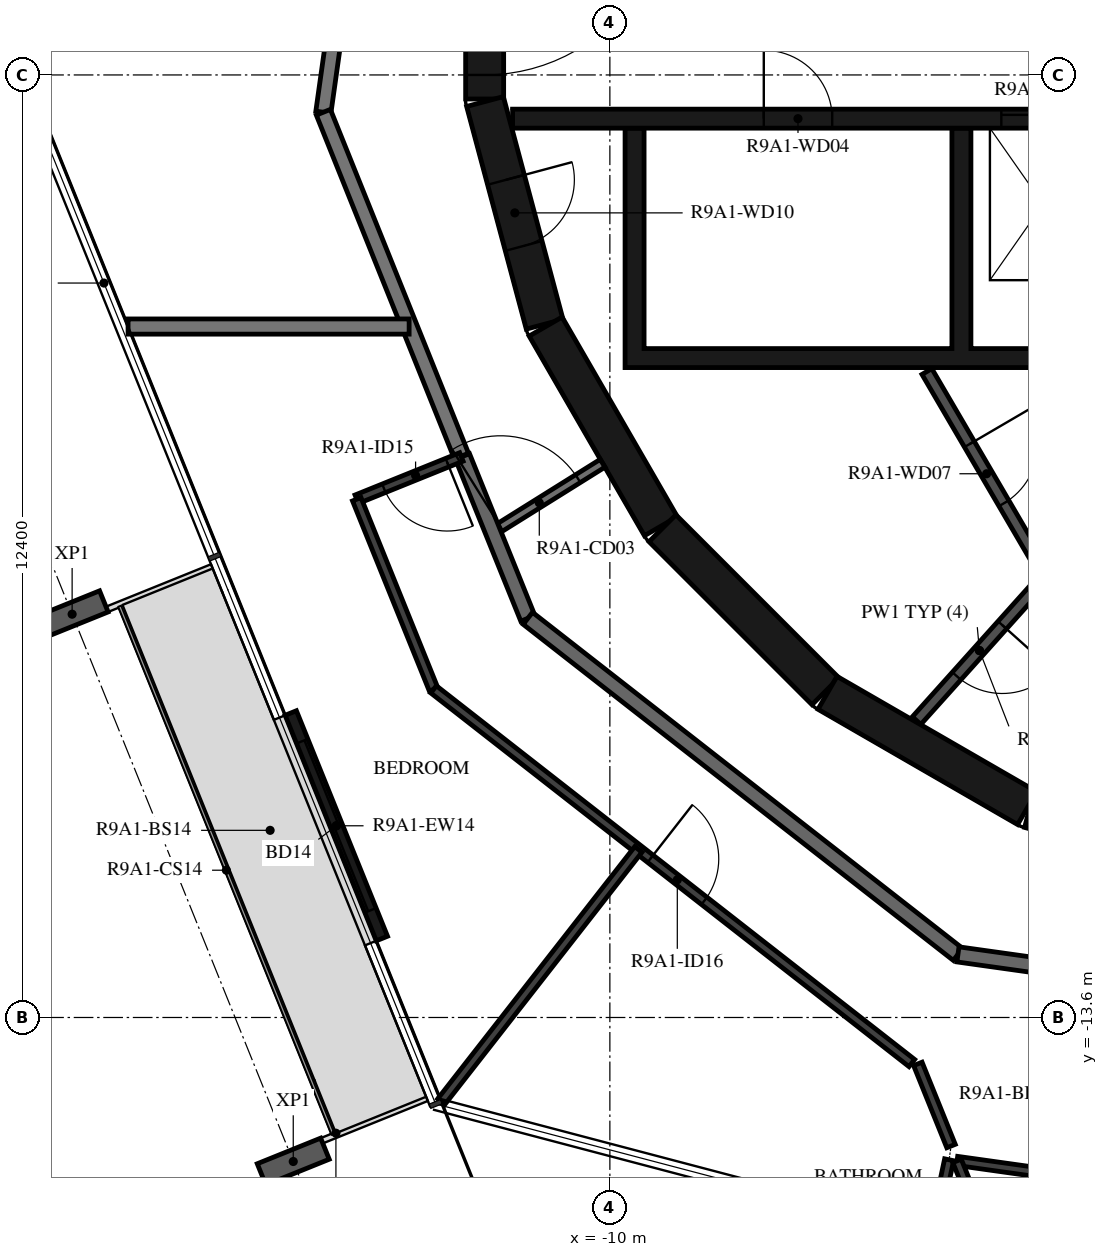
"""IFC4 building model, lengths in metres.
Left out: names, types, materials, properties, quantities, classifications, styles, units other than length and angle.
Written with IfcOpenShell. Run it as: python <this file> out.ifc"""

import sys

from ifc_helpers import new_model, si_unit, direction, frame, frame_2d, origin, origin_2d, place, context, subcontext, project, spatial, polyline, rectangle, i_section, outline, extrude, element, fill, save


model = new_model("IFC4")
c1 = context("Model", 3, precision=1e-05, world=origin(), true_north=direction((0.0, 1.0)))
c2 = subcontext(c1, "Body", "Model", "MODEL_VIEW")
j1 = project(units=[si_unit("LENGTHUNIT", "METRE"), si_unit("PLANEANGLEUNIT", "RADIAN")], contexts=[c1])
p1 = place(None, origin())
s1 = spatial("IfcSite", under=j1, at=p1, CompositionType="ELEMENT")
p2 = place(p1, origin())
s2 = spatial("IfcBuilding", under=s1, at=p2, CompositionType="ELEMENT")
p3 = place(p2, frame((0.0, 0.0, 336.5)))
s3 = spatial("IfcBuildingStorey", under=s2, at=p3, CompositionType="ELEMENT", Elevation=336.5)
for number, where, z_axis, x_axis in (
    (1, (-17.075, -8.294, -0.38), (0.0, 0.0, 1.0), (-0.375, 0.927, 0.0)),
    (2, (-14.166, -15.495, -0.38), (0.0, 0.0, 1.0), (-0.375, 0.927, 0.0)),
):
    element("IfcColumn", number, at=place(p3, frame(where, z_axis=z_axis, x_axis=x_axis)), inside=s3, PredefinedType="COLUMN", context=c2, shape_type="SweptSolid", body=[
        extrude(i_section(OverallWidth=0.3, OverallDepth=0.9, WebThickness=0.019, FlangeThickness=0.035, FilletRadius=0.03, at=origin_2d()), origin(), (0.0, 0.0, 1.0), 3.5),
    ])
p4 = place(p3, frame((-14.198, -9.594, 0.0), z_axis=(0.0, 0.0, 1.0), x_axis=(0.374624519695, -0.927176611678, 0.0)))
e3 = element("IfcWall", 3, at=p4, inside=s3, PredefinedType="STANDARD", context=c2, shape_type="SweptSolid", body=[
    extrude(rectangle(XDim=3.2, YDim=0.16, at=frame_2d((1.6, 0.0))), origin(), (0.0, 0.0, 1.0), 3.12),
])
p5 = place(p4, frame((0.4, 0.0, 0.0)))
e4 = element("IfcOpeningElement", 4, at=p5, cuts=e3, PredefinedType="OPENING", context=c2, shape_type="SweptSolid", body=[
    extrude(rectangle(XDim=2.4, YDim=2.4, at=frame_2d((1.2, 1.2))), frame((0.0, 0.09, 0.0), z_axis=(0.0, -1.0, 0.0), x_axis=(1.0, 0.0, 0.0)), (0.0, 0.0, 1.0), 0.18),
])
p6 = place(p3, frame((-11.647, 1.516, 0.0), z_axis=(0.0, 0.0, 1.0), x_axis=(0.0, -1.0, 0.0)))
e5 = element("IfcWall", 5, at=p6, inside=s3, PredefinedType="SHEAR", context=c2, shape_type="SweptSolid", body=[
    extrude(rectangle(XDim=3.033, YDim=0.5, at=frame_2d((1.516, 0.0))), origin(), (0.0, 0.0, 1.0), 3.12),
])
p7 = place(p6, frame((0.316, 0.0, 0.0)))
e6 = element("IfcOpeningElement", 6, at=p7, cuts=e5, PredefinedType="OPENING", context=c2, shape_type="SweptSolid", body=[
    extrude(rectangle(XDim=2.4, YDim=2.1, at=frame_2d((1.2, 1.05))), frame((0.0, 0.26, 0.0), z_axis=(0.0, -1.0, 0.0), x_axis=(1.0, 0.0, 0.0)), (0.0, 0.0, 1.0), 0.52),
])
p8 = place(p3, frame((-11.643, -1.55, 0.0), z_axis=(0.0, 0.0, 1.0), x_axis=(0.258734743916, -0.965948410781, 0.0)))
e7 = element("IfcWall", 7, at=p8, inside=s3, PredefinedType="SHEAR", context=c2, shape_type="SweptSolid", body=[
    extrude(rectangle(XDim=3.033, YDim=0.5, at=frame_2d((1.516, 0.0))), origin(), (0.0, 0.0, 1.0), 3.12),
])
p9 = place(p8, frame((1.066, 0.0, 0.0)))
e8 = element("IfcOpeningElement", 8, at=p9, cuts=e7, PredefinedType="OPENING", context=c2, shape_type="SweptSolid", body=[
    extrude(rectangle(XDim=0.9, YDim=2.1, at=frame_2d((0.45, 1.05))), frame((0.0, 0.26, 0.0), z_axis=(0.0, -1.0, 0.0), x_axis=(1.0, 0.0, 0.0)), (0.0, 0.0, 1.0), 0.52),
])
p10 = place(p3, frame((-10.845, -4.51, 0.0), z_axis=(0.0, 0.0, 1.0), x_axis=(0.500087131594, -0.865975092491, 0.0)))
e9 = element("IfcWall", 9, at=p10, inside=s3, PredefinedType="SHEAR", context=c2, shape_type="SweptSolid", body=[
    extrude(rectangle(XDim=3.033, YDim=0.5, at=frame_2d((1.516, 0.0))), origin(), (0.0, 0.0, 1.0), 3.12),
])
p11 = place(p3, frame((-9.308, -7.164, 0.0), z_axis=(0.0, 0.0, 1.0), x_axis=(0.707106781187, -0.707106781187, 0.0)))
e10 = element("IfcWall", 10, at=p11, inside=s3, PredefinedType="SHEAR", context=c2, shape_type="SweptSolid", body=[
    extrude(rectangle(XDim=3.032, YDim=0.5, at=frame_2d((1.516, 0.0))), origin(), (0.0, 0.0, 1.0), 3.12),
])
for number, where, z_axis, x_axis in (
    (11, (-7.137, -9.329, 0.0), (0.0, 0.0, 1.0), (0.866, -0.5, 0.0)),
    (12, (-4.479, -10.858, 0.0), (0.0, 0.0, 1.0), (0.966, -0.259, 0.0)),
):
    element("IfcWall", number, at=place(p3, frame(where, z_axis=z_axis, x_axis=x_axis)), inside=s3, PredefinedType="SHEAR", context=c2, shape_type="SweptSolid", body=[
        extrude(rectangle(XDim=3.033, YDim=0.5, at=frame_2d((1.516, 0.0))), origin(), (0.0, 0.0, 1.0), 3.12),
    ])
p12 = place(p3, origin())
e13 = element("IfcWall", 13, at=p12, inside=s3, PredefinedType="SHEAR", context=c2, shape_type="SweptSolid", body=[
    extrude(outline(polyline([(9.8, -5.05), (9.8, -4.8), (9.8, -1.9), (9.55, -1.9), (9.55, -4.8), (7.65, -4.8), (7.65, -1.9), (7.4, -1.9), (7.4, -4.8), (5.5, -4.8), (5.5, -1.9), (5.25, -1.9), (5.25, -4.8), (3.35, -4.8), (3.35, -1.9), (3.1, -1.9), (3.1, -4.8), (1.2, -4.8), (1.2, -1.9), (0.95, -1.9), (0.95, -4.8), (-0.95, -4.8), (-0.95, -1.9), (-1.2, -1.9), (-1.2, -4.8), (-3.1, -4.8), (-3.1, -1.9), (-3.35, -1.9), (-3.35, -4.8), (-5.25, -4.8), (-5.25, -1.9), (-5.5, -1.9), (-5.5, -4.8), (-9.55, -4.8), (-9.55, -1.9), (-9.8, -1.9), (-9.8, -4.8), (-9.8, -5.05), (9.8, -5.05)])), origin(), (0.0, 0.0, 1.0), 3.12),
])
p13 = place(p3, frame((-11.28, -1.775, 0.0), z_axis=(0.0, 0.0, 1.0), x_axis=(1.0, 0.0, 0.0)))
e14 = element("IfcWall", 14, at=p13, inside=s3, PredefinedType="SHEAR", context=c2, shape_type="SweptSolid", body=[
    extrude(rectangle(XDim=14.38, YDim=0.25, at=frame_2d((7.19, 0.0))), origin(), (0.0, 0.0, 1.0), 3.12),
])
p14 = place(p13, frame((6.43, 0.0, 0.0)))
e15 = element("IfcOpeningElement", 15, at=p14, cuts=e14, PredefinedType="OPENING", context=c2, shape_type="SweptSolid", body=[
    extrude(rectangle(XDim=1.1, YDim=2.1, at=frame_2d((0.55, 1.05))), frame((0.0, 0.135, 0.0), z_axis=(0.0, -1.0, 0.0), x_axis=(1.0, 0.0, 0.0)), (0.0, 0.0, 1.0), 0.27),
])
p15 = place(p13, frame((8.58, 0.0, 0.0)))
e16 = element("IfcOpeningElement", 16, at=p15, cuts=e14, PredefinedType="OPENING", context=c2, shape_type="SweptSolid", body=[
    extrude(rectangle(XDim=1.1, YDim=2.1, at=frame_2d((0.55, 1.05))), frame((0.0, 0.135, 0.0), z_axis=(0.0, -1.0, 0.0), x_axis=(1.0, 0.0, 0.0)), (0.0, 0.0, 1.0), 0.27),
])
p16 = place(p13, frame((10.73, 0.0, 0.0)))
e17 = element("IfcOpeningElement", 17, at=p16, cuts=e14, PredefinedType="OPENING", context=c2, shape_type="SweptSolid", body=[
    extrude(rectangle(XDim=1.1, YDim=2.1, at=frame_2d((0.55, 1.05))), frame((0.0, 0.135, 0.0), z_axis=(0.0, -1.0, 0.0), x_axis=(1.0, 0.0, 0.0)), (0.0, 0.0, 1.0), 0.27),
])
p17 = place(p13, frame((3.305, 0.0, 0.0)))
e18 = element("IfcOpeningElement", 18, at=p17, cuts=e14, PredefinedType="OPENING", context=c2, shape_type="SweptSolid", body=[
    extrude(rectangle(XDim=0.9, YDim=2.1, at=frame_2d((0.45, 1.05))), frame((0.0, 0.135, 0.0), z_axis=(0.0, -1.0, 0.0), x_axis=(1.0, 0.0, 0.0)), (0.0, 0.0, 1.0), 0.27),
])
p18 = place(p13, frame((12.98, 0.0, 0.0)))
e19 = element("IfcOpeningElement", 19, at=p18, cuts=e14, PredefinedType="OPENING", context=c2, shape_type="SweptSolid", body=[
    extrude(rectangle(XDim=0.9, YDim=2.1, at=frame_2d((0.45, 1.05))), frame((0.0, 0.135, 0.0), z_axis=(0.0, -1.0, 0.0), x_axis=(1.0, 0.0, 0.0)), (0.0, 0.0, 1.0), 0.27),
])
p19 = place(p3, frame((-5.829, -5.102, 0.0), z_axis=(0.0, 0.0, 1.0), x_axis=(0.504480008384, -0.863423373057, 0.0)))
e20 = element("IfcWall", 20, at=p19, inside=s3, PredefinedType="PARTITIONING", context=c2, shape_type="SweptSolid", body=[
    extrude(rectangle(XDim=3.115, YDim=0.15, at=frame_2d((1.558, 0.0))), origin(), (0.0, 0.0, 1.0), 3.12),
])
p20 = place(p19, frame((1.107, 0.0, 0.0)))
e21 = element("IfcOpeningElement", 21, at=p20, cuts=e20, PredefinedType="OPENING", context=c2, shape_type="SweptSolid", body=[
    extrude(rectangle(XDim=0.9, YDim=2.1, at=frame_2d((0.45, 1.05))), frame((0.0, 0.085, 0.0), z_axis=(0.0, -1.0, 0.0), x_axis=(1.0, 0.0, 0.0)), (0.0, 0.0, 1.0), 0.17),
])
p21 = place(p3, frame((-4.311, -7.851, 0.0), z_axis=(0.0, 0.0, 1.0), x_axis=(-0.667869133096, -0.744278725383, 0.0)))
e22 = element("IfcWall", 22, at=p21, inside=s3, PredefinedType="PARTITIONING", context=c2, shape_type="SweptSolid", body=[
    extrude(rectangle(XDim=2.476, YDim=0.15, at=frame_2d((1.238, 0.0))), origin(), (0.0, 0.0, 1.0), 3.12),
])
p22 = place(p21, frame((0.788, 0.0, 0.0)))
e23 = element("IfcOpeningElement", 23, at=p22, cuts=e22, PredefinedType="OPENING", context=c2, shape_type="SweptSolid", body=[
    extrude(rectangle(XDim=0.9, YDim=2.1, at=frame_2d((0.45, 1.05))), frame((0.0, 0.085, 0.0), z_axis=(0.0, -1.0, 0.0), x_axis=(1.0, 0.0, 0.0)), (0.0, 0.0, 1.0), 0.17),
])
p23 = place(p3, frame((-11.539, -7.21, 0.0), z_axis=(0.0, 0.0, 1.0), x_axis=(0.848103039868, 0.529831325769, 0.0)))
e24 = element("IfcWall", 24, at=p23, inside=s3, PredefinedType="PARTITIONING", context=c2, shape_type="SweptSolid", body=[
    extrude(rectangle(XDim=1.702, YDim=0.12, at=frame_2d((0.851, 0.0))), origin(), (0.0, 0.0, 1.0), 3.12),
])
p24 = place(p23, frame((0.12, 0.0, 0.0)))
e25 = element("IfcOpeningElement", 25, at=p24, cuts=e24, PredefinedType="OPENING", context=c2, shape_type="SweptSolid", body=[
    extrude(rectangle(XDim=1.2, YDim=2.1, at=frame_2d((0.6, 1.05))), frame((0.0, 0.07, 0.0), z_axis=(0.0, -1.0, 0.0), x_axis=(1.0, 0.0, 0.0)), (0.0, 0.0, 1.0), 0.14),
])
p25 = place(p3, frame((-12.77, 5.42, 0.0), z_axis=(0.0, 0.0, 1.0), x_axis=(-0.139155334385, -0.990270565508, 0.0)))
e26 = element("IfcWall", 26, at=p25, inside=s3, PredefinedType="STANDARD", context=c2, shape_type="SweptSolid", body=[
    extrude(rectangle(XDim=7.181, YDim=0.2, at=frame_2d((3.59, 0.0))), origin(), (0.0, 0.0, 1.0), 3.12),
])
p26 = place(p25, frame((1.055, 0.0, 0.0)))
e27 = element("IfcOpeningElement", 27, at=p26, cuts=e26, PredefinedType="OPENING", context=c2, shape_type="SweptSolid", body=[
    extrude(rectangle(XDim=1.8, YDim=2.1, at=frame_2d((0.9, 1.05))), frame((0.0, 0.11, 0.0), z_axis=(0.0, -1.0, 0.0), x_axis=(1.0, 0.0, 0.0)), (0.0, 0.0, 1.0), 0.22),
])
p27 = place(p3, frame((-13.769, -1.691, 0.0), z_axis=(0.0, 0.0, 1.0), x_axis=(0.372720094028, -0.927943819155, 0.0)))
e28 = element("IfcWall", 28, at=p27, inside=s3, PredefinedType="STANDARD", context=c2, shape_type="SweptSolid", body=[
    extrude(rectangle(XDim=4.875, YDim=0.2, at=frame_2d((2.438, 0.0))), origin(), (0.0, 0.0, 1.0), 3.12),
])
p28 = place(p3, frame((-11.939, -6.22, 0.0), z_axis=(0.0, 0.0, 1.0), x_axis=(0.374651128394, -0.927165860024, 0.0)))
e29 = element("IfcWall", 29, at=p28, inside=s3, PredefinedType="STANDARD", context=c2, shape_type="SweptSolid", body=[
    extrude(rectangle(XDim=2.296, YDim=0.2, at=frame_2d((1.148, 0.0))), origin(), (0.0, 0.0, 1.0), 3.12),
])
p29 = place(p3, frame((-11.079, -8.349, 0.0), z_axis=(0.0, 0.0, 1.0), x_axis=(0.78800478687, -0.615669112324, 0.0)))
e30 = element("IfcWall", 30, at=p29, inside=s3, PredefinedType="STANDARD", context=c2, shape_type="SweptSolid", body=[
    extrude(rectangle(XDim=7.181, YDim=0.2, at=frame_2d((3.591, 0.0))), origin(), (0.0, 0.0, 1.0), 3.12),
])
p30 = place(p3, frame((-5.42, -12.77, 0.0), z_axis=(0.0, 0.0, 1.0), x_axis=(0.990270565508, -0.139155334385, 0.0)))
e31 = element("IfcWall", 31, at=p30, inside=s3, PredefinedType="STANDARD", context=c2, shape_type="SweptSolid", body=[
    extrude(rectangle(XDim=7.181, YDim=0.2, at=frame_2d((3.59, 0.0))), origin(), (0.0, 0.0, 1.0), 3.12),
])
p31 = place(p30, frame((2.39, 0.0, 0.0)))
e32 = element("IfcOpeningElement", 32, at=p31, cuts=e31, PredefinedType="OPENING", context=c2, shape_type="SweptSolid", body=[
    extrude(rectangle(XDim=1.0, YDim=2.1, at=frame_2d((0.5, 1.05))), frame((0.0, 0.11, 0.0), z_axis=(0.0, -1.0, 0.0), x_axis=(1.0, 0.0, 0.0)), (0.0, 0.0, 1.0), 0.22),
])
p32 = place(p30, frame((4.091, 0.0, 0.0)))
e33 = element("IfcOpeningElement", 33, at=p32, cuts=e31, PredefinedType="OPENING", context=c2, shape_type="SweptSolid", body=[
    extrude(rectangle(XDim=1.0, YDim=2.1, at=frame_2d((0.5, 1.05))), frame((0.0, 0.11, 0.0), z_axis=(0.0, -1.0, 0.0), x_axis=(1.0, 0.0, 0.0)), (0.0, 0.0, 1.0), 0.22),
])
p33 = place(p3, frame((-16.339, -4.51, 0.0), z_axis=(0.0, 0.0, 1.0), x_axis=(1.0, 0.0, 0.0)))
e34 = element("IfcWall", 34, at=p33, inside=s3, PredefinedType="STANDARD", context=c2, shape_type="SweptSolid", body=[
    extrude(rectangle(XDim=3.698, YDim=0.2, at=frame_2d((1.849, 0.0))), origin(), (0.0, 0.0, 1.0), 3.12),
])
p34 = place(p3, frame((-11.953, -6.225, 0.0), z_axis=(0.0, 0.0, 1.0), x_axis=(-0.927144096717, -0.374704982518, 0.0)))
e35 = element("IfcWall", 35, at=p34, inside=s3, PredefinedType="PARTITIONING", context=c2, shape_type="SweptSolid", body=[
    extrude(rectangle(XDim=1.485, YDim=0.12, at=frame_2d((0.742, 0.0))), origin(), (0.0, 0.0, 1.0), 3.12),
])
p35 = place(p34, frame((0.2, 0.0, 0.0)))
e36 = element("IfcOpeningElement", 36, at=p35, cuts=e35, PredefinedType="OPENING", context=c2, shape_type="SweptSolid", body=[
    extrude(rectangle(XDim=0.9, YDim=2.1, at=frame_2d((0.45, 1.05))), frame((0.0, 0.07, 0.0), z_axis=(0.0, -1.0, 0.0), x_axis=(1.0, 0.0, 0.0)), (0.0, 0.0, 1.0), 0.14),
])
p36 = place(p3, frame((-13.33, -6.782, 0.0), z_axis=(0.0, 0.0, 1.0), x_axis=(0.374602180132, -0.927185637637, 0.0)))
e37 = element("IfcWall", 37, at=p36, inside=s3, PredefinedType="PARTITIONING", context=c2, shape_type="SweptSolid", body=[
    extrude(rectangle(XDim=2.698, YDim=0.12, at=frame_2d((1.349, 0.0))), origin(), (0.0, 0.0, 1.0), 3.12),
])
p37 = place(p3, frame((-12.319, -9.283, 0.0), z_axis=(0.0, 0.0, 1.0), x_axis=(0.788000268464, -0.61567489546, 0.0)))
e38 = element("IfcWall", 38, at=p37, inside=s3, PredefinedType="PARTITIONING", context=c2, shape_type="SweptSolid", body=[
    extrude(rectangle(XDim=7.985, YDim=0.12, at=frame_2d((3.992, 0.0))), origin(), (0.0, 0.0, 1.0), 3.12),
])
p38 = place(p37, frame((3.619, 0.0, 0.0)))
e39 = element("IfcOpeningElement", 39, at=p38, cuts=e38, PredefinedType="OPENING", context=c2, shape_type="SweptSolid", body=[
    extrude(rectangle(XDim=0.9, YDim=2.1, at=frame_2d((0.45, 1.05))), frame((0.0, 0.07, 0.0), z_axis=(0.0, -1.0, 0.0), x_axis=(1.0, 0.0, 0.0)), (0.0, 0.0, 1.0), 0.14),
])
p39 = place(p3, frame((-5.948, -14.21, 0.0), z_axis=(0.0, 0.0, 1.0), x_axis=(0.374601530156, -0.927185900241, 0.0)))
e40 = element("IfcWall", 40, at=p39, inside=s3, PredefinedType="PARTITIONING", context=c2, shape_type="SweptSolid", body=[
    extrude(rectangle(XDim=1.166, YDim=0.12, at=frame_2d((0.583, 0.0))), origin(), (0.0, 0.0, 1.0), 3.12),
])
p40 = place(p3, frame((-5.433, -15.487, 0.0), z_axis=(0.0, 0.0, 1.0), x_axis=(0.990268451053, -0.139170380644, 0.0)))
e41 = element("IfcWall", 41, at=p40, inside=s3, PredefinedType="PARTITIONING", context=c2, shape_type="SweptSolid", body=[
    extrude(rectangle(XDim=1.595, YDim=0.12, at=frame_2d((0.797, 0.0))), origin(), (0.0, 0.0, 1.0), 3.12),
])
p41 = place(p3, frame((-12.219, -14.708, 0.0), z_axis=(0.0, 0.0, 1.0), x_axis=(0.615656413137, 0.788014708596, 0.0)))
e42 = element("IfcWall", 42, at=p41, inside=s3, PredefinedType="PARTITIONING", context=c2, shape_type="SweptSolid", body=[
    extrude(rectangle(XDim=4.213, YDim=0.12, at=frame_2d((2.106, 0.0))), origin(), (0.0, 0.0, 1.0), 3.12),
])
p42 = place(p3, frame((-7.305, -23.815, 0.0), z_axis=(0.0, 0.0, 1.0), x_axis=(0.207366409306, 0.978263345062, 0.0)))
e43 = element("IfcWall", 43, at=p42, inside=s3, PredefinedType="PARTITIONING", context=c2, shape_type="SweptSolid", body=[
    extrude(rectangle(XDim=8.529, YDim=0.12, at=frame_2d((4.264, 0.0))), origin(), (0.0, 0.0, 1.0), 3.12),
])
p43 = place(p42, frame((0.4, 0.0, 0.0)))
e44 = element("IfcOpeningElement", 44, at=p43, cuts=e43, PredefinedType="OPENING", context=c2, shape_type="SweptSolid", body=[
    extrude(rectangle(XDim=0.9, YDim=2.1, at=frame_2d((0.45, 1.05))), frame((0.0, 0.07, 0.0), z_axis=(0.0, -1.0, 0.0), x_axis=(1.0, 0.0, 0.0)), (0.0, 0.0, 1.0), 0.14),
])
p44 = place(p3, frame((-4.445, -17.93, 0.0), z_axis=(0.0, 0.0, 1.0), x_axis=(-0.374614676827, 0.927180588616, 0.0)))
e45 = element("IfcWall", 45, at=p44, inside=s3, PredefinedType="PARTITIONING", context=c2, shape_type="SweptSolid", body=[
    extrude(rectangle(XDim=2.635, YDim=0.12, at=frame_2d((1.318, 0.0))), origin(), (0.0, 0.0, 1.0), 3.12),
])
p45 = place(p5, origin())
e46 = element("IfcDoor", 46, at=p45, inside=s3, OperationType="DOUBLE_DOOR_SLIDING", PredefinedType="DOOR", context=c2, shape_type="SweptSolid", body=[
    extrude(rectangle(XDim=2.4, YDim=2.4, at=frame_2d((1.2, 1.2))), frame((0.0, 0.025, 0.0), z_axis=(0.0, -1.0, 0.0), x_axis=(1.0, 0.0, 0.0)), (0.0, 0.0, 1.0), 0.05),
])
fill(e4, e46)
p46 = place(p7, origin())
e47 = element("IfcDoor", 47, at=p46, inside=s3, OperationType="DOUBLE_DOOR_SINGLE_SWING", PredefinedType="DOOR", context=c2, shape_type="SweptSolid", body=[
    extrude(rectangle(XDim=2.4, YDim=2.1, at=frame_2d((1.2, 1.05))), frame((0.0, 0.025, 0.0), z_axis=(0.0, -1.0, 0.0), x_axis=(1.0, 0.0, 0.0)), (0.0, 0.0, 1.0), 0.05),
])
fill(e6, e47)
p47 = place(p14, origin())
e48 = element("IfcDoor", 48, at=p47, inside=s3, OperationType="DOUBLE_DOOR_SLIDING", PredefinedType="DOOR", context=c2, shape_type="SweptSolid", body=[
    extrude(rectangle(XDim=1.1, YDim=2.1, at=frame_2d((0.55, 1.05))), frame((0.0, 0.025, 0.0), z_axis=(0.0, -1.0, 0.0), x_axis=(1.0, 0.0, 0.0)), (0.0, 0.0, 1.0), 0.05),
])
fill(e15, e48)
p48 = place(p17, origin())
e49 = element("IfcDoor", 49, at=p48, inside=s3, OperationType="SINGLE_SWING_RIGHT", PredefinedType="DOOR", context=c2, shape_type="SweptSolid", body=[
    extrude(rectangle(XDim=0.9, YDim=2.1, at=frame_2d((0.45, 1.05))), frame((0.0, 0.025, 0.0), z_axis=(0.0, -1.0, 0.0), x_axis=(1.0, 0.0, 0.0)), (0.0, 0.0, 1.0), 0.05),
])
fill(e18, e49)
p49 = place(p22, origin())
e50 = element("IfcDoor", 50, at=p49, inside=s3, OperationType="SINGLE_SWING_RIGHT", PredefinedType="DOOR", context=c2, shape_type="SweptSolid", body=[
    extrude(rectangle(XDim=0.9, YDim=2.1, at=frame_2d((0.45, 1.05))), frame((0.0, 0.025, 0.0), z_axis=(0.0, -1.0, 0.0), x_axis=(1.0, 0.0, 0.0)), (0.0, 0.0, 1.0), 0.05),
])
fill(e23, e50)
p50 = place(p20, origin())
e51 = element("IfcDoor", 51, at=p50, inside=s3, OperationType="SINGLE_SWING_LEFT", PredefinedType="DOOR", context=c2, shape_type="SweptSolid", body=[
    extrude(rectangle(XDim=0.9, YDim=2.1, at=frame_2d((0.45, 1.05))), frame((0.0, 0.025, 0.0), z_axis=(0.0, -1.0, 0.0), x_axis=(1.0, 0.0, 0.0)), (0.0, 0.0, 1.0), 0.05),
])
fill(e21, e51)
p51 = place(p9, origin())
e52 = element("IfcDoor", 52, at=p51, inside=s3, OperationType="SINGLE_SWING_RIGHT", PredefinedType="DOOR", context=c2, shape_type="SweptSolid", body=[
    extrude(rectangle(XDim=0.9, YDim=2.1, at=frame_2d((0.45, 1.05))), frame((0.0, 0.025, 0.0), z_axis=(0.0, -1.0, 0.0), x_axis=(1.0, 0.0, 0.0)), (0.0, 0.0, 1.0), 0.05),
])
fill(e8, e52)
p52 = place(p35, origin())
e53 = element("IfcDoor", 53, at=p52, inside=s3, OperationType="SINGLE_SWING_LEFT", PredefinedType="DOOR", context=c2, shape_type="SweptSolid", body=[
    extrude(rectangle(XDim=0.9, YDim=2.1, at=frame_2d((0.45, 1.05))), frame((0.0, 0.025, 0.0), z_axis=(0.0, -1.0, 0.0), x_axis=(1.0, 0.0, 0.0)), (0.0, 0.0, 1.0), 0.05),
])
fill(e36, e53)
p53 = place(p38, origin())
e54 = element("IfcDoor", 54, at=p53, inside=s3, OperationType="SINGLE_SWING_RIGHT", PredefinedType="DOOR", context=c2, shape_type="SweptSolid", body=[
    extrude(rectangle(XDim=0.9, YDim=2.1, at=frame_2d((0.45, 1.05))), frame((0.0, 0.025, 0.0), z_axis=(0.0, -1.0, 0.0), x_axis=(1.0, 0.0, 0.0)), (0.0, 0.0, 1.0), 0.05),
])
fill(e39, e54)
p54 = place(p24, origin())
e55 = element("IfcDoor", 55, at=p54, inside=s3, OperationType="DOUBLE_DOOR_SINGLE_SWING", PredefinedType="DOOR", context=c2, shape_type="SweptSolid", body=[
    extrude(rectangle(XDim=1.2, YDim=2.1, at=frame_2d((0.6, 1.05))), frame((0.0, 0.025, 0.0), z_axis=(0.0, -1.0, 0.0), x_axis=(1.0, 0.0, 0.0)), (0.0, 0.0, 1.0), 0.05),
])
fill(e25, e55)
save(model, sys.argv[1])
